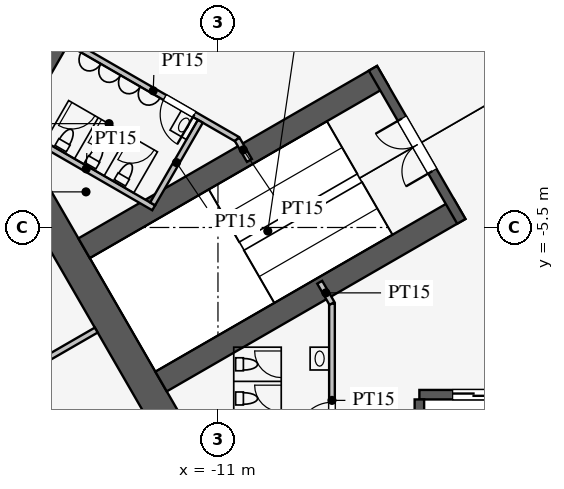
"""IFC4 building model, lengths in metres.
Left out: names, types, materials, properties, quantities, classifications, styles, units other than length and angle.
Written with IfcOpenShell. Run it as: python <this file> out.ifc"""

import sys

from ifc_helpers import new_model, si_unit, direction, frame, frame_2d, origin, place, context, subcontext, project, spatial, rectangle, extrude, element, fill, save


model = new_model("IFC4")
c1 = context("Model", 3, precision=1e-05, world=origin(), true_north=direction((0.0, 1.0)))
c2 = subcontext(c1, "Body", "Model", "MODEL_VIEW")
j1 = project(units=[si_unit("LENGTHUNIT", "METRE"), si_unit("PLANEANGLEUNIT", "RADIAN")], contexts=[c1])
p1 = place(None, origin())
s1 = spatial("IfcSite", under=j1, at=p1, CompositionType="ELEMENT")
p2 = place(p1, origin())
s2 = spatial("IfcBuilding", under=s1, at=p2, CompositionType="ELEMENT")
p3 = place(p2, frame((0.0, 0.0, 45.9)))
s3 = spatial("IfcBuildingStorey", under=s2, at=p3, CompositionType="ELEMENT", Elevation=45.9)
p4 = place(p3, frame((-5.773, 16.0, 0.0), z_axis=(0.0, 0.0, 1.0), x_axis=(-0.500002442456, -0.866023993627, 0.0)))
e1 = element("IfcWall", 1, at=p4, inside=s3, PredefinedType="SHEAR", context=c2, shape_type="SweptSolid", body=[
    extrude(rectangle(XDim=21.939, YDim=0.8, at=frame_2d((10.97, 0.0))), origin(), (0.0, 0.0, 1.0), 4.2),
])
p5 = place(p4, frame((17.27, 0.0, 0.0)))
e2 = element("IfcOpeningElement", 2, at=p5, cuts=e1, PredefinedType="OPENING", context=c2, shape_type="SweptSolid", body=[
    extrude(rectangle(XDim=1.2, YDim=2.1, at=frame_2d((0.6, 1.05))), frame((0.0, 0.41, 0.0), z_axis=(0.0, -1.0, 0.0), x_axis=(1.0, 0.0, 0.0)), (0.0, 0.0, 1.0), 0.82),
])
p6 = place(p4, frame((3.47, 0.0, 0.0)))
e3 = element("IfcOpeningElement", 3, at=p6, cuts=e1, PredefinedType="OPENING", context=c2, shape_type="SweptSolid", body=[
    extrude(rectangle(XDim=1.2, YDim=2.1, at=frame_2d((0.6, 1.05))), frame((0.0, 0.41, 0.0), z_axis=(0.0, -1.0, 0.0), x_axis=(1.0, 0.0, 0.0)), (0.0, 0.0, 1.0), 0.82),
])
p7 = place(p3, frame((-16.743, -3.0, 0.0), z_axis=(0.0, 0.0, 1.0), x_axis=(0.499995765644, -0.866027848477, 0.0)))
e4 = element("IfcWall", 4, at=p7, inside=s3, PredefinedType="SHEAR", context=c2, shape_type="SweptSolid", body=[
    extrude(rectangle(XDim=11.547, YDim=0.8, at=frame_2d((5.773, 0.0))), origin(), (0.0, 0.0, 1.0), 4.2),
])
p8 = place(p3, frame((-5.7, -9.9, 0.0), z_axis=(0.0, 0.0, 1.0), x_axis=(1.0, 0.0, 0.0)))
e5 = element("IfcWall", 5, at=p8, inside=s3, PredefinedType="SHEAR", context=c2, shape_type="SweptSolid", body=[
    extrude(rectangle(XDim=11.4, YDim=0.25, at=frame_2d((5.7, 0.0))), origin(), (0.0, 0.0, 1.0), 4.2),
])
p9 = place(p8, frame((0.875, 0.0, 0.0)))
e6 = element("IfcOpeningElement", 6, at=p9, cuts=e5, PredefinedType="OPENING", context=c2, shape_type="SweptSolid", body=[
    extrude(rectangle(XDim=1.1, YDim=2.2, at=frame_2d((0.55, 1.1))), frame((0.0, 0.135, 0.0), z_axis=(0.0, -1.0, 0.0), x_axis=(1.0, 0.0, 0.0)), (0.0, 0.0, 1.0), 0.27),
])
p10 = place(p8, frame((3.725, 0.0, 0.0)))
e7 = element("IfcOpeningElement", 7, at=p10, cuts=e5, PredefinedType="OPENING", context=c2, shape_type="SweptSolid", body=[
    extrude(rectangle(XDim=1.1, YDim=2.2, at=frame_2d((0.55, 1.1))), frame((0.0, 0.135, 0.0), z_axis=(0.0, -1.0, 0.0), x_axis=(1.0, 0.0, 0.0)), (0.0, 0.0, 1.0), 0.27),
])
p11 = place(p8, frame((6.575, 0.0, 0.0)))
e8 = element("IfcOpeningElement", 8, at=p11, cuts=e5, PredefinedType="OPENING", context=c2, shape_type="SweptSolid", body=[
    extrude(rectangle(XDim=1.1, YDim=2.2, at=frame_2d((0.55, 1.1))), frame((0.0, 0.135, 0.0), z_axis=(0.0, -1.0, 0.0), x_axis=(1.0, 0.0, 0.0)), (0.0, 0.0, 1.0), 0.27),
])
p12 = place(p8, frame((9.425, 0.0, 0.0)))
e9 = element("IfcOpeningElement", 9, at=p12, cuts=e5, PredefinedType="OPENING", context=c2, shape_type="SweptSolid", body=[
    extrude(rectangle(XDim=1.1, YDim=2.2, at=frame_2d((0.55, 1.1))), frame((0.0, 0.135, 0.0), z_axis=(0.0, -1.0, 0.0), x_axis=(1.0, 0.0, 0.0)), (0.0, 0.0, 1.0), 0.27),
])
p13 = place(p3, frame((-5.7, -10.025, 0.0), z_axis=(0.0, 0.0, 1.0), x_axis=(0.0, -1.0, 0.0)))
e10 = element("IfcWall", 10, at=p13, inside=s3, PredefinedType="SHEAR", context=c2, shape_type="SweptSolid", body=[
    extrude(rectangle(XDim=2.575, YDim=0.25, at=frame_2d((1.288, 0.0))), origin(), (0.0, 0.0, 1.0), 4.2),
])
for number, where, z_axis, x_axis in (
    (11, (-6.663, -1.509, 0.0), (0.0, 0.0, 1.0), (-0.866, -0.5, 0.0)),
    (12, (-4.638, -5.016, 0.0), (0.0, 0.0, 1.0), (-0.866, -0.5, 0.0)),
):
    element("IfcWall", number, at=place(p3, frame(where, z_axis=z_axis, x_axis=x_axis)), inside=s3, PredefinedType="SHEAR", context=c2, shape_type="SweptSolid", body=[
        extrude(rectangle(XDim=9.075, YDim=0.6, at=frame_2d((4.538, 0.0))), origin(), (0.0, 0.0, 1.0), 4.2),
    ])
p14 = place(p3, frame((-6.922, -1.312, 0.0), z_axis=(0.0, 0.0, 1.0), x_axis=(0.499984536904, -0.866034331223, 0.0)))
e13 = element("IfcWall", 13, at=p14, inside=s3, PredefinedType="SHEAR", context=c2, shape_type="SweptSolid", body=[
    extrude(rectangle(XDim=4.65, YDim=0.25, at=frame_2d((2.325, 0.0))), origin(), (0.0, 0.0, 1.0), 4.2),
])
p15 = place(p14, frame((1.525, 0.0, 0.0)))
e14 = element("IfcOpeningElement", 14, at=p15, cuts=e13, PredefinedType="OPENING", context=c2, shape_type="SweptSolid", body=[
    extrude(rectangle(XDim=1.6, YDim=2.1, at=frame_2d((0.8, 1.05))), frame((0.0, 0.135, 0.0), z_axis=(0.0, -1.0, 0.0), x_axis=(1.0, 0.0, 0.0)), (0.0, 0.0, 1.0), 0.27),
])
p16 = place(p3, frame((-8.0, -7.5, 0.0), z_axis=(0.0, 0.0, 1.0), x_axis=(0.0, -1.0, 0.0)))
e15 = element("IfcWall", 15, at=p16, inside=s3, PredefinedType="PARTITIONING", context=c2, shape_type="SweptSolid", body=[
    extrude(rectangle(XDim=5.1, YDim=0.15, at=frame_2d((2.55, 0.0))), origin(), (0.0, 0.0, 1.0), 4.0),
])
p17 = place(p16, frame((2.6, 0.0, 0.0)))
e16 = element("IfcOpeningElement", 16, at=p17, cuts=e15, PredefinedType="OPENING", context=c2, shape_type="SweptSolid", body=[
    extrude(rectangle(XDim=0.9, YDim=2.1, at=frame_2d((0.45, 1.05))), frame((0.0, 0.085, 0.0), z_axis=(0.0, -1.0, 0.0), x_axis=(1.0, 0.0, 0.0)), (0.0, 0.0, 1.0), 0.17),
])
p18 = place(p3, frame((-10.495, -3.178, 0.0), z_axis=(0.0, 0.0, 1.0), x_axis=(-0.86602216432, 0.500005610874, 0.0)))
e17 = element("IfcWall", 17, at=p18, inside=s3, PredefinedType="PARTITIONING", context=c2, shape_type="SweptSolid", body=[
    extrude(rectangle(XDim=5.1, YDim=0.15, at=frame_2d((2.55, 0.0))), origin(), (0.0, 0.0, 1.0), 4.0),
])
p19 = place(p18, frame((1.3, 0.0, 0.0)))
e18 = element("IfcOpeningElement", 18, at=p19, cuts=e17, PredefinedType="OPENING", context=c2, shape_type="SweptSolid", body=[
    extrude(rectangle(XDim=0.9, YDim=2.1, at=frame_2d((0.45, 1.05))), frame((0.0, 0.085, 0.0), z_axis=(0.0, -1.0, 0.0), x_axis=(1.0, 0.0, 0.0)), (0.0, 0.0, 1.0), 0.17),
])
for number, where, z_axis, x_axis in (
    (19, (-10.495, -3.178, 0.0), (0.0, 0.0, 1.0), (0.5, -0.866, 0.0)),
    (20, (-8.0, -7.5, 0.0), (0.0, 0.0, 1.0), (-0.5, 0.866, 0.0)),
):
    element("IfcWall", number, at=place(p3, frame(where, z_axis=z_axis, x_axis=x_axis)), inside=s3, PredefinedType="PARTITIONING", context=c2, shape_type="SweptSolid", body=[
        extrude(rectangle(XDim=0.645, YDim=0.15, at=frame_2d((0.323, 0.0))), origin(), (0.0, 0.0, 1.0), 4.0),
    ])
p20 = place(p3, frame((-12.691, -4.982, 0.0), z_axis=(0.0, 0.0, 1.0), x_axis=(-0.8660249478, 0.500000789788, 0.0)))
e21 = element("IfcWall", 21, at=p20, inside=s3, PredefinedType="PARTITIONING", context=c2, shape_type="SweptSolid", body=[
    extrude(rectangle(XDim=4.1, YDim=0.15, at=frame_2d((2.05, 0.0))), origin(), (0.0, 0.0, 1.0), 4.0),
])
p21 = place(p3, frame((-11.464, -2.706, 0.0), z_axis=(0.0, 0.0, 1.0), x_axis=(-0.50001992892, -0.866013897511, 0.0)))
e22 = element("IfcWall", 22, at=p21, inside=s3, PredefinedType="PARTITIONING", context=c2, shape_type="SweptSolid", body=[
    extrude(rectangle(XDim=2.51, YDim=0.15, at=frame_2d((1.255, 0.0))), origin(), (0.0, 0.0, 1.0), 4.0),
])
p22 = place(p3, frame((-14.203, -8.2, 0.0), z_axis=(0.0, 0.0, 1.0), x_axis=(-0.866024965723, -0.500000758745, 0.0)))
e23 = element("IfcWall", 23, at=p22, inside=s3, PredefinedType="PARTITIONING", context=c2, shape_type="SweptSolid", body=[
    extrude(rectangle(XDim=18.25, YDim=0.15, at=frame_2d((9.125, 0.0))), origin(), (0.0, 0.0, 1.0), 2.3),
])
p23 = place(p17, frame((0.9, 0.0, 0.0), z_axis=(0.0, 0.0, 1.0), x_axis=(-1.0, 0.0, 0.0)))
e24 = element("IfcDoor", 24, at=p23, inside=s3, OperationType="SINGLE_SWING_LEFT", PredefinedType="DOOR", context=c2, shape_type="SweptSolid", body=[
    extrude(rectangle(XDim=0.9, YDim=2.1, at=frame_2d((0.45, 1.05))), frame((0.0, 0.025, 0.0), z_axis=(0.0, -1.0, 0.0), x_axis=(1.0, 0.0, 0.0)), (0.0, 0.0, 1.0), 0.05),
])
fill(e16, e24)
p24 = place(p19, origin())
e25 = element("IfcDoor", 25, at=p24, inside=s3, OperationType="SINGLE_SWING_LEFT", PredefinedType="DOOR", context=c2, shape_type="SweptSolid", body=[
    extrude(rectangle(XDim=0.9, YDim=2.1, at=frame_2d((0.45, 1.05))), frame((0.0, 0.025, 0.0), z_axis=(0.0, -1.0, 0.0), x_axis=(1.0, 0.0, 0.0)), (0.0, 0.0, 1.0), 0.05),
])
fill(e18, e25)
p25 = place(p15, frame((1.6, 0.0, 0.0), z_axis=(0.0, 0.0, 1.0), x_axis=(-1.0, 0.0, 0.0)))
e26 = element("IfcDoor", 26, at=p25, inside=s3, OperationType="DOUBLE_DOOR_SINGLE_SWING", PredefinedType="DOOR", context=c2, shape_type="SweptSolid", body=[
    extrude(rectangle(XDim=1.6, YDim=2.1, at=frame_2d((0.8, 1.05))), frame((0.0, 0.025, 0.0), z_axis=(0.0, -1.0, 0.0), x_axis=(1.0, 0.0, 0.0)), (0.0, 0.0, 1.0), 0.05),
])
fill(e14, e26)
p26 = place(p9, origin())
e27 = element("IfcDoor", 27, at=p26, inside=s3, OperationType="DOUBLE_DOOR_SLIDING", PredefinedType="DOOR", context=c2, shape_type="SweptSolid", body=[
    extrude(rectangle(XDim=1.1, YDim=2.2, at=frame_2d((0.55, 1.1))), frame((0.0, 0.025, 0.0), z_axis=(0.0, -1.0, 0.0), x_axis=(1.0, 0.0, 0.0)), (0.0, 0.0, 1.0), 0.05),
])
fill(e6, e27)
save(model, sys.argv[1])
